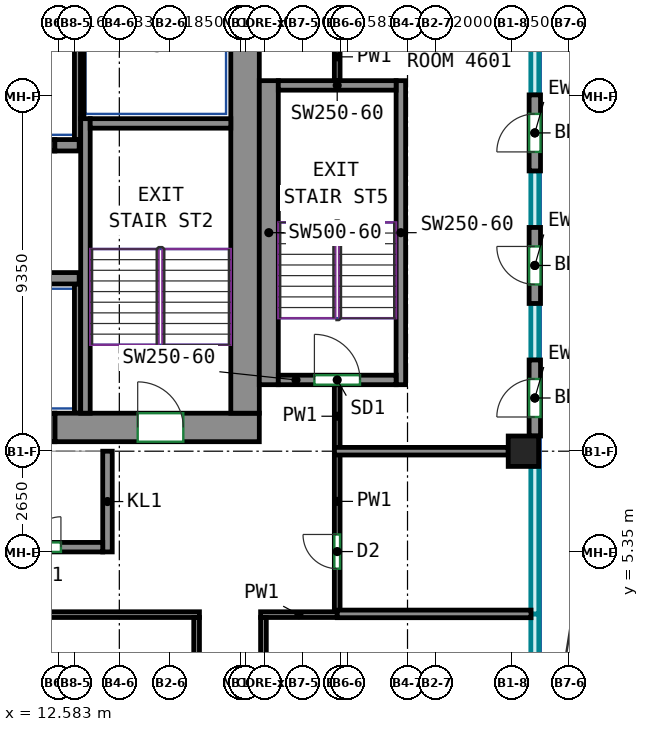
"""IFC4 building model, lengths in metres.
Left out: names, types, materials, properties, quantities, classifications, styles, units other than length and angle.
Written with IfcOpenShell. Run it as: python <this file> out.ifc"""

import sys

from ifc_helpers import new_model, si_unit, direction, frame, frame_2d, origin, origin_2d, place, context, subcontext, project, spatial, rectangle, extrude, source, transform, mapped, element, fill, save


model = new_model("IFC4")
c1 = context("Model", 3, precision=1e-05, world=origin(), true_north=direction((0.0, 1.0)))
c2 = subcontext(c1, "Body", "Model", "MODEL_VIEW")
j1 = project(units=[si_unit("LENGTHUNIT", "METRE"), si_unit("PLANEANGLEUNIT", "RADIAN")], contexts=[c1])
p1 = place(None, origin())
s1 = spatial("IfcSite", under=j1, at=p1, CompositionType="ELEMENT")
p2 = place(p1, origin())
s2 = spatial("IfcBuilding", under=s1, at=p2, CompositionType="ELEMENT")
p3 = place(p2, frame((0.0, 0.0, 192.3)))
s3 = spatial("IfcBuildingStorey", under=s2, at=p3, CompositionType="ELEMENT", Elevation=192.3)
m1 = source(origin(), c2, "Body", "SweptSolid", [
    extrude(rectangle(XDim=0.8, YDim=0.8, at=origin_2d()), origin(), (0.0, 0.0, 1.0), 3.0),
])
p4 = place(p3, frame((24.8, 8.0, 0.0), z_axis=(0.0, 0.0, 1.0), x_axis=(1.0, 0.0, 0.0)))
e1 = element("IfcColumn", 1, at=p4, inside=s3, PredefinedType="COLUMN", context=c2, shape_type="MappedRepresentation", body=[
    mapped(m1, transform((0.0, 0.0, 0.0))),
])
m2 = source(origin(), c2, "Body", "SweptSolid", [
    extrude(rectangle(XDim=5.38, YDim=0.75, at=frame_2d((2.69, 0.0))), origin(), (0.0, 0.0, 1.0), 3.0),
])
p5 = place(p3, frame((12.47, 8.625, 0.0), z_axis=(0.0, 0.0, 1.0), x_axis=(1.0, 0.0, 0.0)))
e2 = element("IfcWall", 2, at=p5, inside=s3, PredefinedType="SHEAR", context=c2, shape_type="MappedRepresentation", body=[
    mapped(m2, transform((0.0, 0.0, 0.0))),
])
p6 = place(p5, frame((2.18, 0.0, 0.0)))
e3 = element("IfcOpeningElement", 3, at=p6, cuts=e2, PredefinedType="OPENING", context=c2, shape_type="SweptSolid", body=[
    extrude(rectangle(XDim=1.2, YDim=2.1, at=frame_2d((0.6, 1.05))), frame((0.0, 0.385, 0.0), z_axis=(0.0, -1.0, 0.0), x_axis=(1.0, 0.0, 0.0)), (0.0, 0.0, 1.0), 0.77),
])
m3 = source(origin(), c2, "Body", "SweptSolid", [
    extrude(rectangle(XDim=12.0, YDim=0.75, at=frame_2d((6.0, 0.0))), origin(), (0.0, 0.0, 1.0), 3.0),
])
p7 = place(p3, frame((17.475, 9.0, 0.0), z_axis=(0.0, 0.0, 1.0), x_axis=(0.0, 1.0, 0.0)))
e4 = element("IfcWall", 4, at=p7, inside=s3, PredefinedType="SHEAR", context=c2, shape_type="MappedRepresentation", body=[
    mapped(m3, transform((0.0, 0.0, 0.0))),
])
m4 = source(origin(), c2, "Body", "SweptSolid", [
    extrude(rectangle(XDim=7.75, YDim=0.25, at=frame_2d((3.875, 0.0))), origin(), (0.0, 0.0, 1.0), 3.0),
])
p8 = place(p3, frame((13.275, 9.0, 0.0), z_axis=(0.0, 0.0, 1.0), x_axis=(0.0, 1.0, 0.0)))
e5 = element("IfcWall", 5, at=p8, inside=s3, PredefinedType="SHEAR", context=c2, shape_type="MappedRepresentation", body=[
    mapped(m4, transform((0.0, 0.0, 0.0))),
])
m5 = source(origin(), c2, "Body", "SweptSolid", [
    extrude(rectangle(XDim=3.7, YDim=0.25, at=frame_2d((1.85, 0.0))), origin(), (0.0, 0.0, 1.0), 3.0),
])
p9 = place(p3, frame((13.4, 16.625, 0.0), z_axis=(0.0, 0.0, 1.0), x_axis=(1.0, 0.0, 0.0)))
e6 = element("IfcWall", 6, at=p9, inside=s3, PredefinedType="SHEAR", context=c2, shape_type="MappedRepresentation", body=[
    mapped(m5, transform((0.0, 0.0, 0.0))),
])
m6 = source(origin(), c2, "Body", "SweptSolid", [
    extrude(rectangle(XDim=8.0, YDim=0.5, at=frame_2d((4.0, 0.0))), origin(), (0.0, 0.0, 1.0), 3.0),
])
p10 = place(p3, frame((18.1, 9.75, 0.0), z_axis=(0.0, 0.0, 1.0), x_axis=(0.0, 1.0, 0.0)))
e7 = element("IfcWall", 7, at=p10, inside=s3, PredefinedType="SHEAR", context=c2, shape_type="MappedRepresentation", body=[
    mapped(m6, transform((0.0, 0.0, 0.0))),
])
m7 = source(origin(), c2, "Body", "SweptSolid", [
    extrude(rectangle(XDim=8.0, YDim=0.25, at=frame_2d((4.0, 0.0))), origin(), (0.0, 0.0, 1.0), 3.0),
])
p11 = place(p3, frame((21.575, 9.75, 0.0), z_axis=(0.0, 0.0, 1.0), x_axis=(0.0, 1.0, 0.0)))
e8 = element("IfcWall", 8, at=p11, inside=s3, PredefinedType="SHEAR", context=c2, shape_type="MappedRepresentation", body=[
    mapped(m7, transform((0.0, 0.0, 0.0))),
])
m8 = source(origin(), c2, "Body", "SweptSolid", [
    extrude(rectangle(XDim=3.1, YDim=0.25, at=frame_2d((1.55, 0.0))), origin(), (0.0, 0.0, 1.0), 3.0),
])
p12 = place(p3, frame((18.35, 9.875, 0.0), z_axis=(0.0, 0.0, 1.0), x_axis=(1.0, 0.0, 0.0)))
e9 = element("IfcWall", 9, at=p12, inside=s3, PredefinedType="SHEAR", context=c2, shape_type="MappedRepresentation", body=[
    mapped(m8, transform((0.0, 0.0, 0.0))),
])
p13 = place(p12, frame((0.95, 0.0, 0.0)))
e10 = element("IfcOpeningElement", 10, at=p13, cuts=e9, PredefinedType="OPENING", context=c2, shape_type="SweptSolid", body=[
    extrude(rectangle(XDim=1.2, YDim=2.1, at=frame_2d((0.6, 1.05))), frame((0.0, 0.135, 0.0), z_axis=(0.0, -1.0, 0.0), x_axis=(1.0, 0.0, 0.0)), (0.0, 0.0, 1.0), 0.27),
])
p14 = place(p3, frame((18.35, 17.625, 0.0), z_axis=(0.0, 0.0, 1.0), x_axis=(1.0, 0.0, 0.0)))
e11 = element("IfcWall", 11, at=p14, inside=s3, PredefinedType="SHEAR", context=c2, shape_type="MappedRepresentation", body=[
    mapped(m8, transform((0.0, 0.0, 0.0))),
])
m9 = source(origin(), c2, "Body", "SweptSolid", [
    extrude(rectangle(XDim=2.82, YDim=0.3, at=frame_2d((1.41, 0.0))), origin(), (0.0, 0.0, 1.0), 3.0),
])
p15 = place(p3, frame((10.29, 12.55, 0.0), z_axis=(0.0, 0.0, 1.0), x_axis=(1.0, 0.0, 0.0)))
e12 = element("IfcWall", 12, at=p15, inside=s3, PredefinedType="SHEAR", context=c2, shape_type="MappedRepresentation", body=[
    mapped(m9, transform((0.0, 0.0, 0.0))),
])
m10 = source(origin(), c2, "Body", "SweptSolid", [
    extrude(rectangle(XDim=0.64, YDim=0.3, at=frame_2d((0.32, 0.0))), origin(), (0.0, 0.0, 1.0), 3.0),
])
p16 = place(p3, frame((12.47, 16.05, 0.0), z_axis=(0.0, 0.0, 1.0), x_axis=(1.0, 0.0, 0.0)))
e13 = element("IfcWall", 13, at=p16, inside=s3, PredefinedType="SHEAR", context=c2, shape_type="MappedRepresentation", body=[
    mapped(m10, transform((0.0, 0.0, 0.0))),
])
m11 = source(origin(), c2, "Body", "SweptSolid", [
    extrude(rectangle(XDim=2.0, YDim=0.3, at=frame_2d((1.0, 0.0))), origin(), (0.0, 0.0, 1.0), 3.0),
])
p17 = place(p3, frame((25.1, 8.4, 0.0), z_axis=(0.0, 0.0, 1.0), x_axis=(0.0, 1.0, 0.0)))
e14 = element("IfcWall", 14, at=p17, inside=s3, PredefinedType="SOLIDWALL", context=c2, shape_type="MappedRepresentation", body=[
    mapped(m11, transform((0.0, 0.0, 0.0))),
])
p18 = place(p17, frame((0.5, 0.0, 0.0)))
e15 = element("IfcOpeningElement", 15, at=p18, cuts=e14, PredefinedType="OPENING", context=c2, shape_type="SweptSolid", body=[
    extrude(rectangle(XDim=1.0, YDim=2.1, at=frame_2d((0.5, 1.05))), frame((0.0, 0.16, 0.0), z_axis=(0.0, -1.0, 0.0), x_axis=(1.0, 0.0, 0.0)), (0.0, 0.0, 1.0), 0.32),
])
p19 = place(p3, frame((25.1, 11.887, 0.0), z_axis=(0.0, 0.0, 1.0), x_axis=(0.0, 1.0, 0.0)))
e16 = element("IfcWall", 16, at=p19, inside=s3, PredefinedType="SOLIDWALL", context=c2, shape_type="MappedRepresentation", body=[
    mapped(m11, transform((0.0, 0.0, 0.0))),
])
p20 = place(p19, frame((0.5, 0.0, 0.0)))
e17 = element("IfcOpeningElement", 17, at=p20, cuts=e16, PredefinedType="OPENING", context=c2, shape_type="SweptSolid", body=[
    extrude(rectangle(XDim=1.0, YDim=2.1, at=frame_2d((0.5, 1.05))), frame((0.0, 0.16, 0.0), z_axis=(0.0, -1.0, 0.0), x_axis=(1.0, 0.0, 0.0)), (0.0, 0.0, 1.0), 0.32),
])
p21 = place(p3, frame((25.1, 15.375, 0.0), z_axis=(0.0, 0.0, 1.0), x_axis=(0.0, 1.0, 0.0)))
e18 = element("IfcWall", 18, at=p21, inside=s3, PredefinedType="SOLIDWALL", context=c2, shape_type="MappedRepresentation", body=[
    mapped(m11, transform((0.0, 0.0, 0.0))),
])
p22 = place(p21, frame((0.5, 0.0, 0.0)))
e19 = element("IfcOpeningElement", 19, at=p22, cuts=e18, PredefinedType="OPENING", context=c2, shape_type="SweptSolid", body=[
    extrude(rectangle(XDim=1.0, YDim=2.1, at=frame_2d((0.5, 1.05))), frame((0.0, 0.16, 0.0), z_axis=(0.0, -1.0, 0.0), x_axis=(1.0, 0.0, 0.0)), (0.0, 0.0, 1.0), 0.32),
])
m12 = source(origin(), c2, "Body", "SweptSolid", [
    extrude(rectangle(XDim=1.4, YDim=0.3, at=frame_2d((0.7, 0.0))), origin(), (0.0, 0.0, 1.0), 3.0),
])
p23 = place(p3, frame((11.07, 16.05, 0.0), z_axis=(0.0, 0.0, 1.0), x_axis=(1.0, 0.0, 0.0)))
e20 = element("IfcWall", 20, at=p23, inside=s3, PredefinedType="PARTITIONING", context=c2, shape_type="MappedRepresentation", body=[
    mapped(m12, transform((0.0, 0.0, 0.0))),
])
p24 = place(p23, frame((0.15, 0.0, 0.0)))
e21 = element("IfcOpeningElement", 21, at=p24, cuts=e20, PredefinedType="OPENING", context=c2, shape_type="SweptSolid", body=[
    extrude(rectangle(XDim=1.1, YDim=2.1, at=frame_2d((0.55, 1.05))), frame((0.0, 0.16, 0.0), z_axis=(0.0, -1.0, 0.0), x_axis=(1.0, 0.0, 0.0)), (0.0, 0.0, 1.0), 0.32),
])
m13 = source(origin(), c2, "Body", "SweptSolid", [
    extrude(rectangle(XDim=2.65, YDim=0.25, at=frame_2d((1.325, 0.0))), origin(), (0.0, 0.0, 1.0), 3.0),
])
p25 = place(p3, frame((13.855, 5.35, 0.0), z_axis=(0.0, 0.0, 1.0), x_axis=(0.0, 1.0, 0.0)))
e22 = element("IfcWall", 22, at=p25, inside=s3, PredefinedType="PARTITIONING", context=c2, shape_type="MappedRepresentation", body=[
    mapped(m13, transform((0.0, 0.0, 0.0))),
])
m14 = source(origin(), c2, "Body", "SweptSolid", [
    extrude(rectangle(XDim=3.0, YDim=0.25, at=frame_2d((1.5, 0.0))), origin(), (0.0, 0.0, 1.0), 3.0),
])
p26 = place(p3, frame((10.73, 5.475, 0.0), z_axis=(0.0, 0.0, 1.0), x_axis=(1.0, 0.0, 0.0)))
e23 = element("IfcWall", 23, at=p26, inside=s3, PredefinedType="PARTITIONING", context=c2, shape_type="MappedRepresentation", body=[
    mapped(m14, transform((0.0, 0.0, 0.0))),
])
p27 = place(p26, frame((1.1, 0.0, 0.0)))
e24 = element("IfcOpeningElement", 24, at=p27, cuts=e23, PredefinedType="OPENING", context=c2, shape_type="SweptSolid", body=[
    extrude(rectangle(XDim=0.8, YDim=2.0, at=frame_2d((0.4, 1.0))), frame((0.0, 0.135, 0.0), z_axis=(0.0, -1.0, 0.0), x_axis=(1.0, 0.0, 0.0)), (0.0, 0.0, 1.0), 0.27),
])
m15 = source(origin(), c2, "Body", "SweptSolid", [
    extrude(rectangle(XDim=3.275, YDim=0.165, at=frame_2d((1.638, 0.0))), origin(), (0.0, 0.0, 1.0), 3.0),
])
p28 = place(p3, frame((13.067, 16.2, 0.0), z_axis=(0.0, 0.0, 1.0), x_axis=(0.0, 1.0, 0.0)))
e25 = element("IfcWall", 25, at=p28, inside=s3, PredefinedType="PARTITIONING", context=c2, shape_type="MappedRepresentation", body=[
    mapped(m15, transform((0.0, 0.0, 0.0))),
])
m16 = source(origin(), c2, "Body", "SweptSolid", [
    extrude(rectangle(XDim=2.725, YDim=0.085, at=frame_2d((1.363, 0.0))), origin(), (0.0, 0.0, 1.0), 3.0),
])
p29 = place(p3, frame((13.192, 16.75, 0.0), z_axis=(0.0, 0.0, 1.0), x_axis=(0.0, 1.0, 0.0)))
e26 = element("IfcWall", 26, at=p29, inside=s3, PredefinedType="PARTITIONING", context=c2, shape_type="MappedRepresentation", body=[
    mapped(m16, transform((0.0, 0.0, 0.0))),
])
m17 = source(origin(), c2, "Body", "SweptSolid", [
    extrude(rectangle(XDim=3.4, YDim=0.165, at=frame_2d((1.7, 0.0))), origin(), (0.0, 0.0, 1.0), 3.0),
])
p30 = place(p3, frame((13.067, 9.0, 0.0), z_axis=(0.0, 0.0, 1.0), x_axis=(0.0, 1.0, 0.0)))
e27 = element("IfcWall", 27, at=p30, inside=s3, PredefinedType="PARTITIONING", context=c2, shape_type="MappedRepresentation", body=[
    mapped(m17, transform((0.0, 0.0, 0.0))),
])
m18 = source(origin(), c2, "Body", "SweptSolid", [
    extrude(rectangle(XDim=1.4, YDim=0.75, at=frame_2d((0.7, 0.0))), origin(), (0.0, 0.0, 1.0), 2.7),
])
p31 = place(p3, frame((11.07, 8.625, 0.0), z_axis=(0.0, 0.0, 1.0), x_axis=(1.0, 0.0, 0.0)))
e28 = element("IfcWall", 28, at=p31, inside=s3, PredefinedType="PARTITIONING", context=c2, shape_type="MappedRepresentation", body=[
    mapped(m18, transform((0.0, 0.0, 0.0))),
])
p32 = place(p31, frame((0.25, 0.0, 0.0)))
e29 = element("IfcOpeningElement", 29, at=p32, cuts=e28, PredefinedType="OPENING", context=c2, shape_type="SweptSolid", body=[
    extrude(rectangle(XDim=0.9, YDim=2.1, at=frame_2d((0.45, 1.05))), frame((0.0, 0.385, 0.0), z_axis=(0.0, -1.0, 0.0), x_axis=(1.0, 0.0, 0.0)), (0.0, 0.0, 1.0), 0.77),
])
p33 = place(p3, frame((19.9, 3.809, 0.0), z_axis=(0.0, 0.0, 1.0), x_axis=(0.0, 1.0, 0.0)))
e30 = element("IfcWall", 30, at=p33, inside=s3, PredefinedType="PARTITIONING", context=c2, shape_type="SweptSolid", body=[
    extrude(rectangle(XDim=4.101, YDim=0.15, at=frame_2d((2.05, 0.0))), origin(), (0.0, 0.0, 1.0), 3.0),
])
p34 = place(p33, frame((1.1, 0.0, 0.0)))
e31 = element("IfcOpeningElement", 31, at=p34, cuts=e30, PredefinedType="OPENING", context=c2, shape_type="SweptSolid", body=[
    extrude(rectangle(XDim=0.9, YDim=2.1, at=frame_2d((0.45, 1.05))), frame((0.0, 0.085, 0.0), z_axis=(0.0, -1.0, 0.0), x_axis=(1.0, 0.0, 0.0)), (0.0, 0.0, 1.0), 0.17),
])
p35 = place(p3, frame((19.9, 17.75, 0.0), z_axis=(0.0, 0.0, 1.0), x_axis=(0.0, 1.0, 0.0)))
e32 = element("IfcWall", 32, at=p35, inside=s3, PredefinedType="PARTITIONING", context=c2, shape_type="SweptSolid", body=[
    extrude(rectangle(XDim=4.175, YDim=0.15, at=frame_2d((2.087, 0.0))), origin(), (0.0, 0.0, 1.0), 3.0),
])
p36 = place(p35, frame((1.638, 0.0, 0.0)))
e33 = element("IfcOpeningElement", 33, at=p36, cuts=e32, PredefinedType="OPENING", context=c2, shape_type="SweptSolid", body=[
    extrude(rectangle(XDim=0.9, YDim=2.1, at=frame_2d((0.45, 1.05))), frame((0.0, 0.085, 0.0), z_axis=(0.0, -1.0, 0.0), x_axis=(1.0, 0.0, 0.0)), (0.0, 0.0, 1.0), 0.17),
])
p37 = place(p3, frame((19.9, 8.09, 0.0), z_axis=(0.0, 0.0, 1.0), x_axis=(0.0, 1.0, 0.0)))
e34 = element("IfcWall", 34, at=p37, inside=s3, PredefinedType="PARTITIONING", context=c2, shape_type="SweptSolid", body=[
    extrude(rectangle(XDim=1.66, YDim=0.15, at=frame_2d((0.83, 0.0))), origin(), (0.0, 0.0, 1.0), 3.0),
])
p38 = place(p3, frame((17.884, 3.7, 0.0), z_axis=(0.0, 0.0, 1.0), x_axis=(1.0, 0.0, 0.0)))
e35 = element("IfcWall", 35, at=p38, inside=s3, PredefinedType="PARTITIONING", context=c2, shape_type="SweptSolid", body=[
    extrude(rectangle(XDim=2.016, YDim=0.15, at=frame_2d((1.008, 0.0))), origin(), (0.0, 0.0, 1.0), 3.0),
])
p39 = place(p3, frame((17.959, -4.725, 0.0), z_axis=(0.0, 0.0, 1.0), x_axis=(0.0, 1.0, 0.0)))
e36 = element("IfcWall", 36, at=p39, inside=s3, PredefinedType="PARTITIONING", context=c2, shape_type="SweptSolid", body=[
    extrude(rectangle(XDim=8.35, YDim=0.15, at=frame_2d((4.175, 0.0))), origin(), (0.0, 0.0, 1.0), 3.0),
])
p40 = place(p39, frame((5.236, 0.0, 0.0)))
e37 = element("IfcOpeningElement", 37, at=p40, cuts=e36, PredefinedType="OPENING", context=c2, shape_type="SweptSolid", body=[
    extrude(rectangle(XDim=0.9, YDim=2.1, at=frame_2d((0.45, 1.05))), frame((0.0, 0.085, 0.0), z_axis=(0.0, -1.0, 0.0), x_axis=(1.0, 0.0, 0.0)), (0.0, 0.0, 1.0), 0.17),
])
p41 = place(p3, frame((-17.575, 3.7, 0.0), z_axis=(0.0, 0.0, 1.0), x_axis=(1.0, 0.0, 0.0)))
e38 = element("IfcWall", 38, at=p41, inside=s3, PredefinedType="PARTITIONING", context=c2, shape_type="SweptSolid", body=[
    extrude(rectangle(XDim=33.85, YDim=0.15, at=frame_2d((16.925, 0.0))), origin(), (0.0, 0.0, 1.0), 3.0),
])
p42 = place(p41, frame((10.584, 0.0, 0.0)))
e39 = element("IfcOpeningElement", 39, at=p42, cuts=e38, PredefinedType="OPENING", context=c2, shape_type="SweptSolid", body=[
    extrude(rectangle(XDim=0.9, YDim=2.1, at=frame_2d((0.45, 1.05))), frame((0.0, 0.085, 0.0), z_axis=(0.0, -1.0, 0.0), x_axis=(1.0, 0.0, 0.0)), (0.0, 0.0, 1.0), 0.17),
])
p43 = place(p41, frame((16.175, 0.0, 0.0)))
e40 = element("IfcOpeningElement", 40, at=p43, cuts=e38, PredefinedType="OPENING", context=c2, shape_type="SweptSolid", body=[
    extrude(rectangle(XDim=0.9, YDim=2.1, at=frame_2d((0.45, 1.05))), frame((0.0, 0.085, 0.0), z_axis=(0.0, -1.0, 0.0), x_axis=(1.0, 0.0, 0.0)), (0.0, 0.0, 1.0), 0.17),
])
p44 = place(p41, frame((25.696, 0.0, 0.0)))
e41 = element("IfcOpeningElement", 41, at=p44, cuts=e38, PredefinedType="OPENING", context=c2, shape_type="SweptSolid", body=[
    extrude(rectangle(XDim=0.9, YDim=2.1, at=frame_2d((0.45, 1.05))), frame((0.0, 0.085, 0.0), z_axis=(0.0, -1.0, 0.0), x_axis=(1.0, 0.0, 0.0)), (0.0, 0.0, 1.0), 0.17),
])
p45 = place(p3, frame((16.2, -4.753, 0.0), z_axis=(0.0, 0.0, 1.0), x_axis=(0.0, 1.0, 0.0)))
e42 = element("IfcWall", 42, at=p45, inside=s3, PredefinedType="PARTITIONING", context=c2, shape_type="SweptSolid", body=[
    extrude(rectangle(XDim=8.378, YDim=0.15, at=frame_2d((4.189, 0.0))), origin(), (0.0, 0.0, 1.0), 3.0),
])
p46 = place(p3, frame((19.827, 8.0, 0.0), z_axis=(0.0, 0.0, 1.0), x_axis=(1.0, 0.0, 0.0)))
e43 = element("IfcWall", 43, at=p46, inside=s3, PredefinedType="PARTITIONING", context=c2, shape_type="SweptSolid", body=[
    extrude(rectangle(XDim=4.573, YDim=0.2, at=frame_2d((2.287, 0.0))), origin(), (0.0, 0.0, 1.0), 3.0),
])
p47 = place(p3, frame((19.902, 3.719, 0.0), z_axis=(0.0, 0.0, 1.0), x_axis=(1.0, 0.0, 0.0)))
e44 = element("IfcWall", 44, at=p47, inside=s3, PredefinedType="PARTITIONING", context=c2, shape_type="SweptSolid", body=[
    extrude(rectangle(XDim=5.098, YDim=0.2, at=frame_2d((2.549, 0.0))), origin(), (0.0, 0.0, 1.0), 3.0),
])
p48 = place(p18, origin())
e45 = element("IfcDoor", 45, at=p48, inside=s3, OperationType="SINGLE_SWING_LEFT", PredefinedType="DOOR", context=c2, shape_type="SweptSolid", body=[
    extrude(rectangle(XDim=1.0, YDim=2.1, at=frame_2d((0.5, 1.05))), frame((0.0, 0.025, 0.0), z_axis=(0.0, -1.0, 0.0), x_axis=(1.0, 0.0, 0.0)), (0.0, 0.0, 1.0), 0.05),
])
fill(e15, e45)
p49 = place(p20, origin())
e46 = element("IfcDoor", 46, at=p49, inside=s3, OperationType="SINGLE_SWING_RIGHT", PredefinedType="DOOR", context=c2, shape_type="SweptSolid", body=[
    extrude(rectangle(XDim=1.0, YDim=2.1, at=frame_2d((0.5, 1.05))), frame((0.0, 0.025, 0.0), z_axis=(0.0, -1.0, 0.0), x_axis=(1.0, 0.0, 0.0)), (0.0, 0.0, 1.0), 0.05),
])
fill(e17, e46)
p50 = place(p22, origin())
e47 = element("IfcDoor", 47, at=p50, inside=s3, OperationType="SINGLE_SWING_LEFT", PredefinedType="DOOR", context=c2, shape_type="SweptSolid", body=[
    extrude(rectangle(XDim=1.0, YDim=2.1, at=frame_2d((0.5, 1.05))), frame((0.0, 0.025, 0.0), z_axis=(0.0, -1.0, 0.0), x_axis=(1.0, 0.0, 0.0)), (0.0, 0.0, 1.0), 0.05),
])
fill(e19, e47)
p51 = place(p27, origin())
e48 = element("IfcDoor", 48, at=p51, inside=s3, OperationType="SINGLE_SWING_RIGHT", PredefinedType="DOOR", context=c2, shape_type="SweptSolid", body=[
    extrude(rectangle(XDim=0.8, YDim=2.0, at=frame_2d((0.4, 1.0))), frame((0.0, 0.025, 0.0), z_axis=(0.0, -1.0, 0.0), x_axis=(1.0, 0.0, 0.0)), (0.0, 0.0, 1.0), 0.05),
])
fill(e24, e48)
p52 = place(p6, origin())
e49 = element("IfcDoor", 49, at=p52, inside=s3, OperationType="DOUBLE_DOOR_SINGLE_SWING", PredefinedType="DOOR", context=c2, shape_type="SweptSolid", body=[
    extrude(rectangle(XDim=1.2, YDim=2.1, at=frame_2d((0.6, 1.05))), frame((0.0, 0.28, 0.0), z_axis=(0.0, -1.0, 0.0), x_axis=(1.0, 0.0, 0.0)), (0.0, 0.0, 1.0), 0.05),
])
fill(e3, e49)
p53 = place(p13, origin())
e50 = element("IfcDoor", 50, at=p53, inside=s3, OperationType="DOUBLE_DOOR_SINGLE_SWING", PredefinedType="DOOR", context=c2, shape_type="SweptSolid", body=[
    extrude(rectangle(XDim=1.2, YDim=2.1, at=frame_2d((0.6, 1.05))), frame((0.0, 0.025, 0.0), z_axis=(0.0, -1.0, 0.0), x_axis=(1.0, 0.0, 0.0)), (0.0, 0.0, 1.0), 0.05),
])
fill(e10, e50)
p54 = place(p34, origin())
e51 = element("IfcDoor", 51, at=p54, inside=s3, OperationType="SINGLE_SWING_RIGHT", PredefinedType="DOOR", context=c2, shape_type="SweptSolid", body=[
    extrude(rectangle(XDim=0.9, YDim=2.1, at=frame_2d((0.45, 1.05))), frame((0.0, 0.025, 0.0), z_axis=(0.0, -1.0, 0.0), x_axis=(1.0, 0.0, 0.0)), (0.0, 0.0, 1.0), 0.05),
])
fill(e31, e51)
save(model, sys.argv[1])
